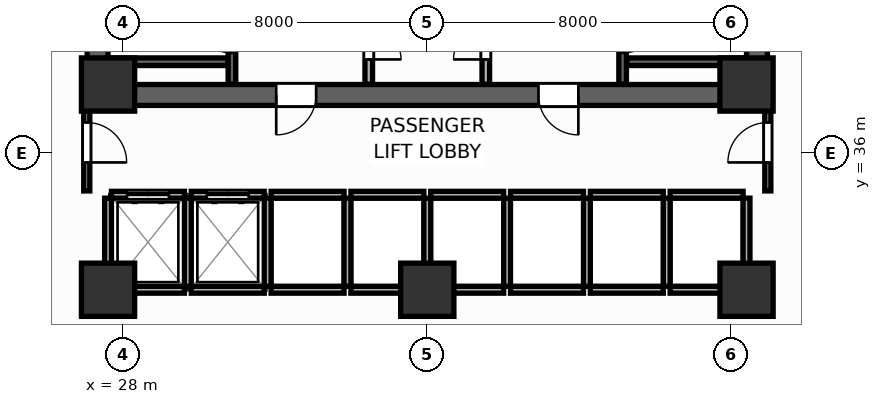
"""IFC4 building model, lengths in metres.
Left out: names, types, materials, properties, quantities, classifications, styles, units other than length and angle.
Written with IfcOpenShell. Run it as: python <this file> out.ifc"""

import sys

from ifc_helpers import new_model, si_unit, direction, frame, frame_2d, origin, origin_2d, place, context, subcontext, project, spatial, rectangle, extrude, source, transform, mapped, element, fill, save


model = new_model("IFC4")
c1 = context("Model", 3, precision=1e-05, world=origin(), true_north=direction((0.0, 1.0)))
c2 = subcontext(c1, "Body", "Model", "MODEL_VIEW")
j1 = project(units=[si_unit("LENGTHUNIT", "METRE"), si_unit("PLANEANGLEUNIT", "RADIAN")], contexts=[c1])
p1 = place(None, origin())
s1 = spatial("IfcSite", under=j1, at=p1, CompositionType="ELEMENT")
p2 = place(p1, origin())
s2 = spatial("IfcBuilding", under=s1, at=p2, CompositionType="ELEMENT")
p3 = place(p2, frame((0.0, 0.0, 47.4)))
s3 = spatial("IfcBuildingStorey", under=s2, at=p3, CompositionType="ELEMENT", Elevation=47.4)
p4 = place(p3, frame((27.05, 37.525, 0.0), z_axis=(0.0, 0.0, 1.0), x_axis=(1.0, 0.0, 0.0)))
e1 = element("IfcWall", 1, at=p4, inside=s3, PredefinedType="SHEAR", context=c2, shape_type="SweptSolid", body=[
    extrude(rectangle(XDim=17.9, YDim=0.55, at=frame_2d((8.95, 0.0))), origin(), (0.0, 0.0, 1.0), 3.9),
])
p5 = place(p4, frame((4.975, 0.0, 0.0)))
e2 = element("IfcOpeningElement", 2, at=p5, cuts=e1, PredefinedType="OPENING", context=c2, shape_type="SweptSolid", body=[
    extrude(rectangle(XDim=1.05, YDim=2.1, at=frame_2d((0.525, 1.05))), frame((0.0, 0.285, 0.0), z_axis=(0.0, -1.0, 0.0), x_axis=(1.0, 0.0, 0.0)), (0.0, 0.0, 1.0), 0.57),
])
p6 = place(p4, frame((11.875, 0.0, 0.0)))
e3 = element("IfcOpeningElement", 3, at=p6, cuts=e1, PredefinedType="OPENING", context=c2, shape_type="SweptSolid", body=[
    extrude(rectangle(XDim=1.05, YDim=2.1, at=frame_2d((0.525, 1.05))), frame((0.0, 0.285, 0.0), z_axis=(0.0, -1.0, 0.0), x_axis=(1.0, 0.0, 0.0)), (0.0, 0.0, 1.0), 0.57),
])
for number, where, z_axis, x_axis in (
    (4, (27.325, 37.8, 0.0), (0.0, 0.0, 1.0), (0.0, 1.0, 0.0)),
    (5, (44.675, 37.8, 0.0), (0.0, 0.0, 1.0), (0.0, 1.0, 0.0)),
):
    element("IfcWall", number, at=place(p3, frame(where, z_axis=z_axis, x_axis=x_axis)), inside=s3, PredefinedType="SHEAR", context=c2, shape_type="SweptSolid", body=[
        extrude(rectangle(XDim=9.0, YDim=0.55, at=frame_2d((4.5, 0.0))), origin(), (0.0, 0.0, 1.0), 3.9),
    ])
m1 = source(origin(), c2, "Body", "SweptSolid", [
    extrude(rectangle(XDim=1.4, YDim=1.4, at=origin_2d()), origin(), (0.0, 0.0, 1.0), 3.9),
])
for number, where, z_axis, x_axis in (
    (6, (27.6, 37.8, 0.0), (0.0, 0.0, 1.0), (1.0, 0.0, 0.0)),
    (7, (44.4, 37.8, 0.0), (0.0, 0.0, 1.0), (1.0, 0.0, 0.0)),
    (8, (27.6, 32.4, 0.0), (0.0, 0.0, 1.0), (1.0, 0.0, 0.0)),
    (9, (44.4, 32.4, 0.0), (0.0, 0.0, 1.0), (1.0, 0.0, 0.0)),
    (10, (36.0, 32.4, 0.0), (0.0, 0.0, 1.0), (1.0, 0.0, 0.0)),
):
    element("IfcColumn", number, at=place(p3, frame(where, z_axis=z_axis, x_axis=x_axis)), inside=s3, PredefinedType="COLUMN", context=c2, shape_type="MappedRepresentation", body=[
        mapped(m1, transform((0.0, 0.0, 0.0), scale=1.0)),
    ])
p7 = place(p3, frame((30.86, 37.81, 0.0), z_axis=(0.0, 0.0, 1.0), x_axis=(0.0, 1.0, 0.0)))
e11 = element("IfcWall", 11, at=p7, inside=s3, PredefinedType="SHEAR", context=c2, shape_type="SweptSolid", body=[
    extrude(rectangle(XDim=8.98, YDim=0.2, at=frame_2d((4.49, 0.0))), origin(), (0.0, 0.0, 1.0), 3.9),
])
p8 = place(p7, frame((0.82, 0.0, 0.0)))
e12 = element("IfcOpeningElement", 12, at=p8, cuts=e11, PredefinedType="OPENING", context=c2, shape_type="SweptSolid", body=[
    extrude(rectangle(XDim=1.05, YDim=2.1, at=frame_2d((0.525, 1.05))), frame((0.0, 0.11, 0.0), z_axis=(0.0, -1.0, 0.0), x_axis=(1.0, 0.0, 0.0)), (0.0, 0.0, 1.0), 0.22),
])
p9 = place(p3, frame((27.61, 38.4, 0.0), z_axis=(0.0, 0.0, 1.0), x_axis=(1.0, 0.0, 0.0)))
e13 = element("IfcWall", 13, at=p9, inside=s3, PredefinedType="SHEAR", context=c2, shape_type="SweptSolid", body=[
    extrude(rectangle(XDim=3.14, YDim=0.2, at=frame_2d((1.57, 0.0))), origin(), (0.0, 0.0, 1.0), 3.9),
])
p10 = place(p3, frame((41.14, 37.81, 0.0), z_axis=(0.0, 0.0, 1.0), x_axis=(0.0, 1.0, 0.0)))
e14 = element("IfcWall", 14, at=p10, inside=s3, PredefinedType="SHEAR", context=c2, shape_type="SweptSolid", body=[
    extrude(rectangle(XDim=8.98, YDim=0.2, at=frame_2d((4.49, 0.0))), origin(), (0.0, 0.0, 1.0), 3.9),
])
p11 = place(p10, frame((0.82, 0.0, 0.0)))
e15 = element("IfcOpeningElement", 15, at=p11, cuts=e14, PredefinedType="OPENING", context=c2, shape_type="SweptSolid", body=[
    extrude(rectangle(XDim=1.05, YDim=2.1, at=frame_2d((0.525, 1.05))), frame((0.0, 0.11, 0.0), z_axis=(0.0, -1.0, 0.0), x_axis=(1.0, 0.0, 0.0)), (0.0, 0.0, 1.0), 0.22),
])
p12 = place(p3, frame((41.25, 38.4, 0.0), z_axis=(0.0, 0.0, 1.0), x_axis=(1.0, 0.0, 0.0)))
e16 = element("IfcWall", 16, at=p12, inside=s3, PredefinedType="SHEAR", context=c2, shape_type="SweptSolid", body=[
    extrude(rectangle(XDim=3.14, YDim=0.2, at=frame_2d((1.57, 0.0))), origin(), (0.0, 0.0, 1.0), 3.9),
])
p13 = place(p3, frame((34.46, 37.81, 0.0), z_axis=(0.0, 0.0, 1.0), x_axis=(0.0, 1.0, 0.0)))
e17 = element("IfcWall", 17, at=p13, inside=s3, PredefinedType="PARTITIONING", context=c2, shape_type="SweptSolid", body=[
    extrude(rectangle(XDim=8.98, YDim=0.2, at=frame_2d((4.49, 0.0))), origin(), (0.0, 0.0, 1.0), 3.68),
])
p14 = place(p13, frame((0.65, 0.0, 0.0)))
e18 = element("IfcOpeningElement", 18, at=p14, cuts=e17, PredefinedType="OPENING", context=c2, shape_type="SweptSolid", body=[
    extrude(rectangle(XDim=0.85, YDim=2.05, at=frame_2d((0.425, 1.025))), frame((0.0, 0.11, 0.0), z_axis=(0.0, -1.0, 0.0), x_axis=(1.0, 0.0, 0.0)), (0.0, 0.0, 1.0), 0.22),
])
p15 = place(p3, frame((37.54, 37.81, 0.0), z_axis=(0.0, 0.0, 1.0), x_axis=(0.0, 1.0, 0.0)))
e19 = element("IfcWall", 19, at=p15, inside=s3, PredefinedType="PARTITIONING", context=c2, shape_type="SweptSolid", body=[
    extrude(rectangle(XDim=8.98, YDim=0.2, at=frame_2d((4.49, 0.0))), origin(), (0.0, 0.0, 1.0), 3.68),
])
p16 = place(p15, frame((0.65, 0.0, 0.0)))
e20 = element("IfcOpeningElement", 20, at=p16, cuts=e19, PredefinedType="OPENING", context=c2, shape_type="SweptSolid", body=[
    extrude(rectangle(XDim=0.85, YDim=2.05, at=frame_2d((0.425, 1.025))), frame((0.0, 0.11, 0.0), z_axis=(0.0, -1.0, 0.0), x_axis=(1.0, 0.0, 0.0)), (0.0, 0.0, 1.0), 0.22),
])
p17 = place(p3, frame((27.69, 34.9, 0.0), z_axis=(0.0, 0.0, 1.0), x_axis=(1.0, 0.0, 0.0)))
e21 = element("IfcWall", 21, at=p17, inside=s3, PredefinedType="PARTITIONING", context=c2, shape_type="SweptSolid", body=[
    extrude(rectangle(XDim=1.92, YDim=0.18, at=frame_2d((0.96, 0.0))), origin(), (0.0, 0.0, 1.0), 3.68),
])
p18 = place(p17, frame((0.41, 0.0, 0.0)))
e22 = element("IfcOpeningElement", 22, at=p18, cuts=e21, PredefinedType="OPENING", context=c2, shape_type="SweptSolid", body=[
    extrude(rectangle(XDim=1.1, YDim=2.1, at=frame_2d((0.55, 1.05))), frame((0.0, 0.1, 0.0), z_axis=(0.0, -1.0, 0.0), x_axis=(1.0, 0.0, 0.0)), (0.0, 0.0, 1.0), 0.2),
])
p19 = place(p3, frame((27.69, 32.4, 0.0), z_axis=(0.0, 0.0, 1.0), x_axis=(1.0, 0.0, 0.0)))
e23 = element("IfcWall", 23, at=p19, inside=s3, PredefinedType="PARTITIONING", context=c2, shape_type="SweptSolid", body=[
    extrude(rectangle(XDim=1.92, YDim=0.18, at=frame_2d((0.96, 0.0))), origin(), (0.0, 0.0, 1.0), 3.18),
])
p20 = place(p3, frame((27.6, 32.49, 0.0), z_axis=(0.0, 0.0, 1.0), x_axis=(0.0, 1.0, 0.0)))
e24 = element("IfcWall", 24, at=p20, inside=s3, PredefinedType="PARTITIONING", context=c2, shape_type="SweptSolid", body=[
    extrude(rectangle(XDim=2.32, YDim=0.18, at=frame_2d((1.16, 0.0))), origin(), (0.0, 0.0, 1.0), 3.68),
])
p21 = place(p3, frame((29.79, 34.9, 0.0), z_axis=(0.0, 0.0, 1.0), x_axis=(1.0, 0.0, 0.0)))
e25 = element("IfcWall", 25, at=p21, inside=s3, PredefinedType="PARTITIONING", context=c2, shape_type="SweptSolid", body=[
    extrude(rectangle(XDim=1.92, YDim=0.18, at=frame_2d((0.96, 0.0))), origin(), (0.0, 0.0, 1.0), 3.68),
])
p22 = place(p21, frame((0.41, 0.0, 0.0)))
e26 = element("IfcOpeningElement", 26, at=p22, cuts=e25, PredefinedType="OPENING", context=c2, shape_type="SweptSolid", body=[
    extrude(rectangle(XDim=1.1, YDim=2.1, at=frame_2d((0.55, 1.05))), frame((0.0, 0.1, 0.0), z_axis=(0.0, -1.0, 0.0), x_axis=(1.0, 0.0, 0.0)), (0.0, 0.0, 1.0), 0.2),
])
p23 = place(p3, frame((29.79, 32.4, 0.0), z_axis=(0.0, 0.0, 1.0), x_axis=(1.0, 0.0, 0.0)))
e27 = element("IfcWall", 27, at=p23, inside=s3, PredefinedType="PARTITIONING", context=c2, shape_type="SweptSolid", body=[
    extrude(rectangle(XDim=1.92, YDim=0.18, at=frame_2d((0.96, 0.0))), origin(), (0.0, 0.0, 1.0), 3.18),
])
p24 = place(p3, frame((29.7, 32.49, 0.0), z_axis=(0.0, 0.0, 1.0), x_axis=(0.0, 1.0, 0.0)))
e28 = element("IfcWall", 28, at=p24, inside=s3, PredefinedType="PARTITIONING", context=c2, shape_type="SweptSolid", body=[
    extrude(rectangle(XDim=2.32, YDim=0.18, at=frame_2d((1.16, 0.0))), origin(), (0.0, 0.0, 1.0), 3.68),
])
p25 = place(p3, frame((31.89, 34.9, 0.0), z_axis=(0.0, 0.0, 1.0), x_axis=(1.0, 0.0, 0.0)))
e29 = element("IfcWall", 29, at=p25, inside=s3, PredefinedType="PARTITIONING", context=c2, shape_type="SweptSolid", body=[
    extrude(rectangle(XDim=1.92, YDim=0.18, at=frame_2d((0.96, 0.0))), origin(), (0.0, 0.0, 1.0), 3.68),
])
p26 = place(p3, frame((31.89, 32.4, 0.0), z_axis=(0.0, 0.0, 1.0), x_axis=(1.0, 0.0, 0.0)))
e30 = element("IfcWall", 30, at=p26, inside=s3, PredefinedType="PARTITIONING", context=c2, shape_type="SweptSolid", body=[
    extrude(rectangle(XDim=1.92, YDim=0.18, at=frame_2d((0.96, 0.0))), origin(), (0.0, 0.0, 1.0), 3.18),
])
p27 = place(p3, frame((31.8, 32.49, 0.0), z_axis=(0.0, 0.0, 1.0), x_axis=(0.0, 1.0, 0.0)))
e31 = element("IfcWall", 31, at=p27, inside=s3, PredefinedType="PARTITIONING", context=c2, shape_type="SweptSolid", body=[
    extrude(rectangle(XDim=2.32, YDim=0.18, at=frame_2d((1.16, 0.0))), origin(), (0.0, 0.0, 1.0), 3.68),
])
p28 = place(p3, frame((33.99, 34.9, 0.0), z_axis=(0.0, 0.0, 1.0), x_axis=(1.0, 0.0, 0.0)))
e32 = element("IfcWall", 32, at=p28, inside=s3, PredefinedType="PARTITIONING", context=c2, shape_type="SweptSolid", body=[
    extrude(rectangle(XDim=1.92, YDim=0.18, at=frame_2d((0.96, 0.0))), origin(), (0.0, 0.0, 1.0), 3.68),
])
p29 = place(p3, frame((33.99, 32.4, 0.0), z_axis=(0.0, 0.0, 1.0), x_axis=(1.0, 0.0, 0.0)))
e33 = element("IfcWall", 33, at=p29, inside=s3, PredefinedType="PARTITIONING", context=c2, shape_type="SweptSolid", body=[
    extrude(rectangle(XDim=1.92, YDim=0.18, at=frame_2d((0.96, 0.0))), origin(), (0.0, 0.0, 1.0), 3.18),
])
p30 = place(p3, frame((33.9, 32.49, 0.0), z_axis=(0.0, 0.0, 1.0), x_axis=(0.0, 1.0, 0.0)))
e34 = element("IfcWall", 34, at=p30, inside=s3, PredefinedType="PARTITIONING", context=c2, shape_type="SweptSolid", body=[
    extrude(rectangle(XDim=2.32, YDim=0.18, at=frame_2d((1.16, 0.0))), origin(), (0.0, 0.0, 1.0), 3.68),
])
p31 = place(p3, frame((36.09, 34.9, 0.0), z_axis=(0.0, 0.0, 1.0), x_axis=(1.0, 0.0, 0.0)))
e35 = element("IfcWall", 35, at=p31, inside=s3, PredefinedType="PARTITIONING", context=c2, shape_type="SweptSolid", body=[
    extrude(rectangle(XDim=1.92, YDim=0.18, at=frame_2d((0.96, 0.0))), origin(), (0.0, 0.0, 1.0), 3.68),
])
p32 = place(p3, frame((36.09, 32.4, 0.0), z_axis=(0.0, 0.0, 1.0), x_axis=(1.0, 0.0, 0.0)))
e36 = element("IfcWall", 36, at=p32, inside=s3, PredefinedType="PARTITIONING", context=c2, shape_type="SweptSolid", body=[
    extrude(rectangle(XDim=1.92, YDim=0.18, at=frame_2d((0.96, 0.0))), origin(), (0.0, 0.0, 1.0), 3.18),
])
p33 = place(p3, frame((36.0, 32.49, 0.0), z_axis=(0.0, 0.0, 1.0), x_axis=(0.0, 1.0, 0.0)))
e37 = element("IfcWall", 37, at=p33, inside=s3, PredefinedType="PARTITIONING", context=c2, shape_type="SweptSolid", body=[
    extrude(rectangle(XDim=2.32, YDim=0.18, at=frame_2d((1.16, 0.0))), origin(), (0.0, 0.0, 1.0), 3.68),
])
p34 = place(p3, frame((38.19, 34.9, 0.0), z_axis=(0.0, 0.0, 1.0), x_axis=(1.0, 0.0, 0.0)))
e38 = element("IfcWall", 38, at=p34, inside=s3, PredefinedType="PARTITIONING", context=c2, shape_type="SweptSolid", body=[
    extrude(rectangle(XDim=1.92, YDim=0.18, at=frame_2d((0.96, 0.0))), origin(), (0.0, 0.0, 1.0), 3.68),
])
p35 = place(p3, frame((38.19, 32.4, 0.0), z_axis=(0.0, 0.0, 1.0), x_axis=(1.0, 0.0, 0.0)))
e39 = element("IfcWall", 39, at=p35, inside=s3, PredefinedType="PARTITIONING", context=c2, shape_type="SweptSolid", body=[
    extrude(rectangle(XDim=1.92, YDim=0.18, at=frame_2d((0.96, 0.0))), origin(), (0.0, 0.0, 1.0), 3.18),
])
p36 = place(p3, frame((38.1, 32.49, 0.0), z_axis=(0.0, 0.0, 1.0), x_axis=(0.0, 1.0, 0.0)))
e40 = element("IfcWall", 40, at=p36, inside=s3, PredefinedType="PARTITIONING", context=c2, shape_type="SweptSolid", body=[
    extrude(rectangle(XDim=2.32, YDim=0.18, at=frame_2d((1.16, 0.0))), origin(), (0.0, 0.0, 1.0), 3.68),
])
p37 = place(p3, frame((40.29, 34.9, 0.0), z_axis=(0.0, 0.0, 1.0), x_axis=(1.0, 0.0, 0.0)))
e41 = element("IfcWall", 41, at=p37, inside=s3, PredefinedType="PARTITIONING", context=c2, shape_type="SweptSolid", body=[
    extrude(rectangle(XDim=1.92, YDim=0.18, at=frame_2d((0.96, 0.0))), origin(), (0.0, 0.0, 1.0), 3.68),
])
p38 = place(p3, frame((40.29, 32.4, 0.0), z_axis=(0.0, 0.0, 1.0), x_axis=(1.0, 0.0, 0.0)))
e42 = element("IfcWall", 42, at=p38, inside=s3, PredefinedType="PARTITIONING", context=c2, shape_type="SweptSolid", body=[
    extrude(rectangle(XDim=1.92, YDim=0.18, at=frame_2d((0.96, 0.0))), origin(), (0.0, 0.0, 1.0), 3.18),
])
p39 = place(p3, frame((40.2, 32.49, 0.0), z_axis=(0.0, 0.0, 1.0), x_axis=(0.0, 1.0, 0.0)))
e43 = element("IfcWall", 43, at=p39, inside=s3, PredefinedType="PARTITIONING", context=c2, shape_type="SweptSolid", body=[
    extrude(rectangle(XDim=2.32, YDim=0.18, at=frame_2d((1.16, 0.0))), origin(), (0.0, 0.0, 1.0), 3.68),
])
p40 = place(p3, frame((42.39, 34.9, 0.0), z_axis=(0.0, 0.0, 1.0), x_axis=(1.0, 0.0, 0.0)))
e44 = element("IfcWall", 44, at=p40, inside=s3, PredefinedType="PARTITIONING", context=c2, shape_type="SweptSolid", body=[
    extrude(rectangle(XDim=1.92, YDim=0.18, at=frame_2d((0.96, 0.0))), origin(), (0.0, 0.0, 1.0), 3.68),
])
p41 = place(p3, frame((42.39, 32.4, 0.0), z_axis=(0.0, 0.0, 1.0), x_axis=(1.0, 0.0, 0.0)))
e45 = element("IfcWall", 45, at=p41, inside=s3, PredefinedType="PARTITIONING", context=c2, shape_type="SweptSolid", body=[
    extrude(rectangle(XDim=1.92, YDim=0.18, at=frame_2d((0.96, 0.0))), origin(), (0.0, 0.0, 1.0), 3.18),
])
for number, where, z_axis, x_axis in (
    (46, (42.3, 32.49, 0.0), (0.0, 0.0, 1.0), (0.0, 1.0, 0.0)),
    (47, (44.4, 32.49, 0.0), (0.0, 0.0, 1.0), (0.0, 1.0, 0.0)),
):
    element("IfcWall", number, at=place(p3, frame(where, z_axis=z_axis, x_axis=x_axis)), inside=s3, PredefinedType="PARTITIONING", context=c2, shape_type="SweptSolid", body=[
        extrude(rectangle(XDim=2.32, YDim=0.18, at=frame_2d((1.16, 0.0))), origin(), (0.0, 0.0, 1.0), 3.68),
    ])
p42 = place(p3, frame((27.04, 35.0, 0.0), z_axis=(0.0, 0.0, 1.0), x_axis=(0.0, 1.0, 0.0)))
e48 = element("IfcWall", 48, at=p42, inside=s3, PredefinedType="PARTITIONING", context=c2, shape_type="SweptSolid", body=[
    extrude(rectangle(XDim=2.65, YDim=0.16, at=frame_2d((1.325, 0.0))), origin(), (0.0, 0.0, 1.0), 3.68),
])
p43 = place(p42, frame((0.75, 0.0, 0.0)))
e49 = element("IfcOpeningElement", 49, at=p43, cuts=e48, PredefinedType="OPENING", context=c2, shape_type="SweptSolid", body=[
    extrude(rectangle(XDim=1.05, YDim=2.1, at=frame_2d((0.525, 1.05))), frame((0.0, 0.09, 0.0), z_axis=(0.0, -1.0, 0.0), x_axis=(1.0, 0.0, 0.0)), (0.0, 0.0, 1.0), 0.18),
])
p44 = place(p3, frame((44.96, 35.0, 0.0), z_axis=(0.0, 0.0, 1.0), x_axis=(0.0, 1.0, 0.0)))
e50 = element("IfcWall", 50, at=p44, inside=s3, PredefinedType="PARTITIONING", context=c2, shape_type="SweptSolid", body=[
    extrude(rectangle(XDim=2.65, YDim=0.16, at=frame_2d((1.325, 0.0))), origin(), (0.0, 0.0, 1.0), 3.68),
])
p45 = place(p44, frame((0.75, 0.0, 0.0)))
e51 = element("IfcOpeningElement", 51, at=p45, cuts=e50, PredefinedType="OPENING", context=c2, shape_type="SweptSolid", body=[
    extrude(rectangle(XDim=1.05, YDim=2.1, at=frame_2d((0.525, 1.05))), frame((0.0, 0.09, 0.0), z_axis=(0.0, -1.0, 0.0), x_axis=(1.0, 0.0, 0.0)), (0.0, 0.0, 1.0), 0.18),
])
p46 = place(p8, origin())
e52 = element("IfcDoor", 52, at=p46, inside=s3, OperationType="SINGLE_SWING_RIGHT", PredefinedType="DOOR", context=c2, shape_type="SweptSolid", body=[
    extrude(rectangle(XDim=1.05, YDim=2.1, at=frame_2d((0.525, 1.05))), frame((0.0, 0.025, 0.0), z_axis=(0.0, -1.0, 0.0), x_axis=(1.0, 0.0, 0.0)), (0.0, 0.0, 1.0), 0.05),
])
fill(e12, e52)
p47 = place(p11, frame((1.05, 0.0, 0.0), z_axis=(0.0, 0.0, 1.0), x_axis=(-1.0, 0.0, 0.0)))
e53 = element("IfcDoor", 53, at=p47, inside=s3, OperationType="SINGLE_SWING_LEFT", PredefinedType="DOOR", context=c2, shape_type="SweptSolid", body=[
    extrude(rectangle(XDim=1.05, YDim=2.1, at=frame_2d((0.525, 1.05))), frame((0.0, 0.025, 0.0), z_axis=(0.0, -1.0, 0.0), x_axis=(1.0, 0.0, 0.0)), (0.0, 0.0, 1.0), 0.05),
])
fill(e15, e53)
p48 = place(p14, frame((0.85, 0.0, 0.0), z_axis=(0.0, 0.0, 1.0), x_axis=(-1.0, 0.0, 0.0)))
e54 = element("IfcDoor", 54, at=p48, inside=s3, OperationType="SINGLE_SWING_RIGHT", PredefinedType="DOOR", context=c2, shape_type="SweptSolid", body=[
    extrude(rectangle(XDim=0.85, YDim=2.05, at=frame_2d((0.425, 1.025))), frame((0.0, 0.025, 0.0), z_axis=(0.0, -1.0, 0.0), x_axis=(1.0, 0.0, 0.0)), (0.0, 0.0, 1.0), 0.05),
])
fill(e18, e54)
p49 = place(p16, origin())
e55 = element("IfcDoor", 55, at=p49, inside=s3, OperationType="SINGLE_SWING_LEFT", PredefinedType="DOOR", context=c2, shape_type="SweptSolid", body=[
    extrude(rectangle(XDim=0.85, YDim=2.05, at=frame_2d((0.425, 1.025))), frame((0.0, 0.025, 0.0), z_axis=(0.0, -1.0, 0.0), x_axis=(1.0, 0.0, 0.0)), (0.0, 0.0, 1.0), 0.05),
])
fill(e20, e55)
p50 = place(p18, origin())
e56 = element("IfcDoor", 56, at=p50, inside=s3, OperationType="DOUBLE_DOOR_SLIDING", PredefinedType="DOOR", context=c2, shape_type="SweptSolid", body=[
    extrude(rectangle(XDim=1.1, YDim=2.1, at=frame_2d((0.55, 1.05))), frame((0.0, 0.025, 0.0), z_axis=(0.0, -1.0, 0.0), x_axis=(1.0, 0.0, 0.0)), (0.0, 0.0, 1.0), 0.05),
])
fill(e22, e56)
p51 = place(p22, origin())
e57 = element("IfcDoor", 57, at=p51, inside=s3, OperationType="DOUBLE_DOOR_SLIDING", PredefinedType="DOOR", context=c2, shape_type="SweptSolid", body=[
    extrude(rectangle(XDim=1.1, YDim=2.1, at=frame_2d((0.55, 1.05))), frame((0.0, 0.025, 0.0), z_axis=(0.0, -1.0, 0.0), x_axis=(1.0, 0.0, 0.0)), (0.0, 0.0, 1.0), 0.05),
])
fill(e26, e57)
p52 = place(p43, frame((1.05, 0.0, 0.0), z_axis=(0.0, 0.0, 1.0), x_axis=(-1.0, 0.0, 0.0)))
e58 = element("IfcDoor", 58, at=p52, inside=s3, OperationType="SINGLE_SWING_RIGHT", PredefinedType="DOOR", context=c2, shape_type="SweptSolid", body=[
    extrude(rectangle(XDim=1.05, YDim=2.1, at=frame_2d((0.525, 1.05))), frame((0.0, 0.025, 0.0), z_axis=(0.0, -1.0, 0.0), x_axis=(1.0, 0.0, 0.0)), (0.0, 0.0, 1.0), 0.05),
])
fill(e49, e58)
p53 = place(p45, origin())
e59 = element("IfcDoor", 59, at=p53, inside=s3, OperationType="SINGLE_SWING_LEFT", PredefinedType="DOOR", context=c2, shape_type="SweptSolid", body=[
    extrude(rectangle(XDim=1.05, YDim=2.1, at=frame_2d((0.525, 1.05))), frame((0.0, 0.025, 0.0), z_axis=(0.0, -1.0, 0.0), x_axis=(1.0, 0.0, 0.0)), (0.0, 0.0, 1.0), 0.05),
])
fill(e51, e59)
p54 = place(p5, frame((1.05, 0.0, 0.0), z_axis=(0.0, 0.0, 1.0), x_axis=(-1.0, 0.0, 0.0)))
e60 = element("IfcDoor", 60, at=p54, inside=s3, OperationType="SINGLE_SWING_RIGHT", PredefinedType="DOOR", context=c2, shape_type="SweptSolid", body=[
    extrude(rectangle(XDim=1.05, YDim=2.1, at=frame_2d((0.525, 1.05))), frame((0.0, 0.025, 0.0), z_axis=(0.0, -1.0, 0.0), x_axis=(1.0, 0.0, 0.0)), (0.0, 0.0, 1.0), 0.05),
])
fill(e2, e60)
p55 = place(p6, frame((1.05, 0.0, 0.0), z_axis=(0.0, 0.0, 1.0), x_axis=(-1.0, 0.0, 0.0)))
e61 = element("IfcDoor", 61, at=p55, inside=s3, OperationType="SINGLE_SWING_LEFT", PredefinedType="DOOR", context=c2, shape_type="SweptSolid", body=[
    extrude(rectangle(XDim=1.05, YDim=2.1, at=frame_2d((0.525, 1.05))), frame((0.0, 0.025, 0.0), z_axis=(0.0, -1.0, 0.0), x_axis=(1.0, 0.0, 0.0)), (0.0, 0.0, 1.0), 0.05),
])
fill(e3, e61)
save(model, sys.argv[1])
